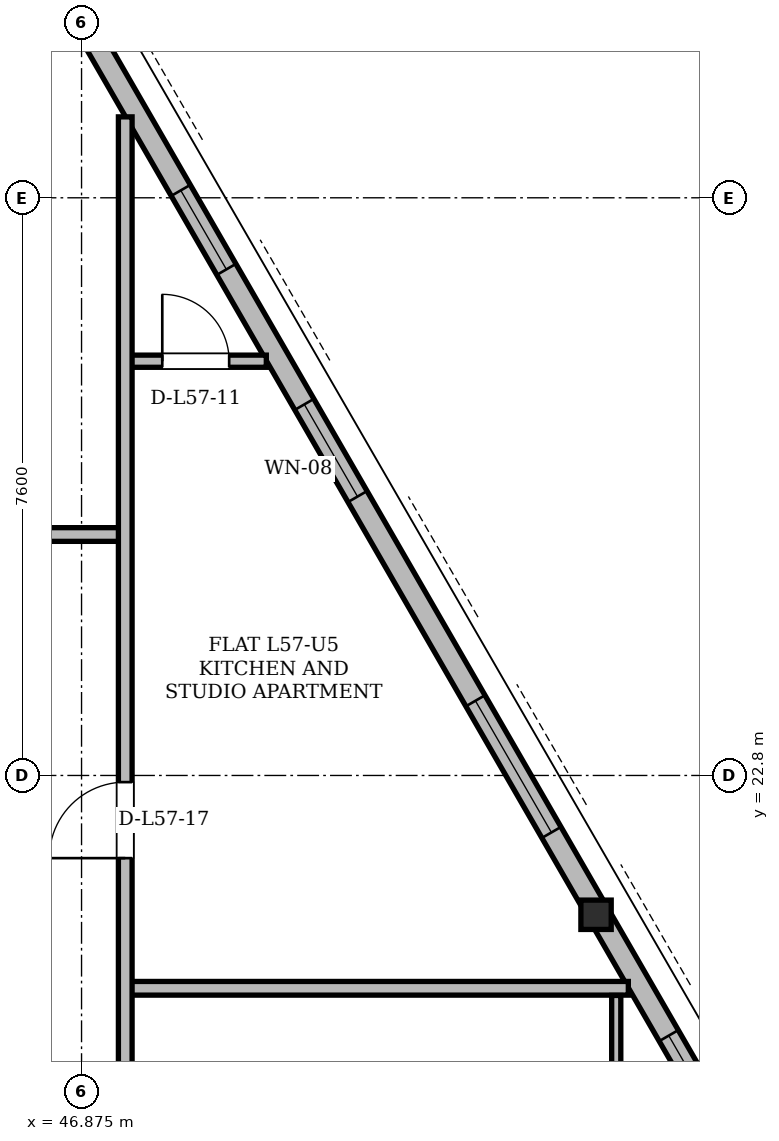
"""IFC4 building model, lengths in metres.
Left out: names, types, materials, properties, quantities, classifications, styles, units other than length and angle.
Written with IfcOpenShell. Run it as: python <this file> out.ifc"""

import sys

from ifc_helpers import new_model, si_unit, direction, frame, frame_2d, origin, origin_2d, place, context, subcontext, project, spatial, rectangle, i_section, extrude, element, fill, save


model = new_model("IFC4")
c1 = context("Model", 3, precision=1e-05, world=origin(), true_north=direction((0.0, 1.0)))
c2 = subcontext(c1, "Body", "Model", "MODEL_VIEW")
j1 = project(units=[si_unit("LENGTHUNIT", "METRE"), si_unit("PLANEANGLEUNIT", "RADIAN")], contexts=[c1])
p1 = place(None, origin())
s1 = spatial("IfcSite", under=j1, at=p1, CompositionType="ELEMENT")
p2 = place(p1, origin())
s2 = spatial("IfcBuilding", under=s1, at=p2, CompositionType="ELEMENT")
p3 = place(p2, frame((0.0, 0.0, 216.3)))
s3 = spatial("IfcBuildingStorey", under=s2, at=p3, CompositionType="ELEMENT", Elevation=216.3)
p4 = place(p3, frame((53.67, 20.989, 0.004), z_axis=(-0.014478387519, -0.011895388806, 0.999824422596), x_axis=(0.634816777898, -0.772662706813, 0.0)))
e1 = element("IfcColumn", 1, at=p4, inside=s3, PredefinedType="COLUMN", context=c2, shape_type="SweptSolid", body=[
    extrude(i_section(OverallWidth=0.399, OverallDepth=0.386, WebThickness=0.021, FlangeThickness=0.033, at=origin_2d()), origin(), (0.0, 0.0, 1.0), 3.592),
])
p5 = place(p3, frame((59.157, 11.485, 0.0), z_axis=(0.0, 0.0, 1.0), x_axis=(-0.500000353019, 0.866025199969, 0.0)))
e2 = element("IfcWall", 2, at=p5, inside=s3, PredefinedType="SOLIDWALL", context=c2, shape_type="SweptSolid", body=[
    extrude(rectangle(XDim=36.579, YDim=0.29, at=frame_2d((18.289, 0.0))), origin(), (0.0, 0.0, 1.0), 2.677),
])
p6 = place(p5, frame((3.429, 0.0, 0.0)))
e3 = element("IfcOpeningElement", 3, at=p6, cuts=e2, PredefinedType="OPENING", context=c2, shape_type="SweptSolid", body=[
    extrude(rectangle(XDim=1.5, YDim=2.2, at=frame_2d((0.75, 1.1))), frame((0.0, 0.145, 0.0), z_axis=(0.0, -1.0, 0.0), x_axis=(1.0, 0.0, 0.0)), (0.0, 0.0, 1.0), 0.29),
])
p7 = place(p5, frame((27.044, 0.0, 0.0)))
e4 = element("IfcOpeningElement", 4, at=p7, cuts=e2, PredefinedType="OPENING", context=c2, shape_type="SweptSolid", body=[
    extrude(rectangle(XDim=1.5, YDim=2.2, at=frame_2d((0.75, 1.1))), frame((0.0, 0.145, 0.0), z_axis=(0.0, -1.0, 0.0), x_axis=(1.0, 0.0, 0.0)), (0.0, 0.0, 1.0), 0.29),
])
p8 = place(p5, frame((7.913, 0.0, 0.85)))
e5 = element("IfcOpeningElement", 5, at=p8, cuts=e2, PredefinedType="OPENING", context=c2, shape_type="SweptSolid", body=[
    extrude(rectangle(XDim=1.2, YDim=1.48, at=frame_2d((0.6, 0.74))), frame((0.0, 0.145, 0.0), z_axis=(0.0, -1.0, 0.0), x_axis=(1.0, 0.0, 0.0)), (0.0, 0.0, 1.0), 0.29),
])
p9 = place(p5, frame((1.258, 0.0, 0.85)))
e6 = element("IfcOpeningElement", 6, at=p9, cuts=e2, PredefinedType="OPENING", context=c2, shape_type="SweptSolid", body=[
    extrude(rectangle(XDim=1.2, YDim=1.48, at=frame_2d((0.6, 0.74))), frame((0.0, 0.145, 0.0), z_axis=(0.0, -1.0, 0.0), x_axis=(1.0, 0.0, 0.0)), (0.0, 0.0, 1.0), 0.29),
])
p10 = place(p5, frame((12.2, 0.0, 0.85)))
e7 = element("IfcOpeningElement", 7, at=p10, cuts=e2, PredefinedType="OPENING", context=c2, shape_type="SweptSolid", body=[
    extrude(rectangle(XDim=2.0, YDim=1.717, at=frame_2d((1.0, 0.858))), frame((0.0, 0.145, 0.0), z_axis=(0.0, -1.0, 0.0), x_axis=(1.0, 0.0, 0.0)), (0.0, 0.0, 1.0), 0.29),
])
p11 = place(p5, frame((17.302, 0.0, 0.85)))
e8 = element("IfcOpeningElement", 8, at=p11, cuts=e2, PredefinedType="OPENING", context=c2, shape_type="SweptSolid", body=[
    extrude(rectangle(XDim=1.4, YDim=1.6, at=frame_2d((0.7, 0.8))), frame((0.0, 0.145, 0.0), z_axis=(0.0, -1.0, 0.0), x_axis=(1.0, 0.0, 0.0)), (0.0, 0.0, 1.0), 0.29),
])
p12 = place(p5, frame((20.753, 0.0, 0.85)))
e9 = element("IfcOpeningElement", 9, at=p12, cuts=e2, PredefinedType="OPENING", context=c2, shape_type="SweptSolid", body=[
    extrude(rectangle(XDim=1.2, YDim=1.48, at=frame_2d((0.6, 0.74))), frame((0.0, 0.145, 0.0), z_axis=(0.0, -1.0, 0.0), x_axis=(1.0, 0.0, 0.0)), (0.0, 0.0, 1.0), 0.29),
])
p13 = place(p5, frame((34.201, 0.0, 0.85)))
e10 = element("IfcOpeningElement", 10, at=p13, cuts=e2, PredefinedType="OPENING", context=c2, shape_type="SweptSolid", body=[
    extrude(rectangle(XDim=1.2, YDim=1.48, at=frame_2d((0.6, 0.74))), frame((0.0, 0.145, 0.0), z_axis=(0.0, -1.0, 0.0), x_axis=(1.0, 0.0, 0.0)), (0.0, 0.0, 1.0), 0.29),
])
p14 = place(p3, frame((47.45, 20.0, 0.0), z_axis=(0.0, 0.0, 1.0), x_axis=(1.0, 0.0, 0.0)))
e11 = element("IfcWall", 11, at=p14, inside=s3, PredefinedType="PARTITIONING", context=c2, shape_type="SweptSolid", body=[
    extrude(rectangle(XDim=6.619, YDim=0.18, at=frame_2d((3.31, 0.0))), origin(), (0.0, 0.0, 1.0), 3.38),
])
p15 = place(p3, frame((25.6, 25.97, 0.0), z_axis=(0.0, 0.0, 1.0), x_axis=(1.0, 0.0, 0.0)))
e12 = element("IfcWall", 12, at=p15, inside=s3, PredefinedType="PARTITIONING", context=c2, shape_type="SweptSolid", body=[
    extrude(rectangle(XDim=21.85, YDim=0.18, at=frame_2d((10.925, 0.0))), origin(), (0.0, 0.0, 1.0), 2.913),
])
p16 = place(p15, frame((5.347, 0.0, 0.0)))
e13 = element("IfcOpeningElement", 13, at=p16, cuts=e12, PredefinedType="OPENING", context=c2, shape_type="SweptSolid", body=[
    extrude(rectangle(XDim=1.0, YDim=2.18, at=frame_2d((0.5, 1.09))), frame((0.0, 0.09, 0.0), z_axis=(0.0, -1.0, 0.0), x_axis=(1.0, 0.0, 0.0)), (0.0, 0.0, 1.0), 0.18),
])
p17 = place(p15, frame((15.35, 0.0, 0.0)))
e14 = element("IfcOpeningElement", 14, at=p17, cuts=e12, PredefinedType="OPENING", context=c2, shape_type="SweptSolid", body=[
    extrude(rectangle(XDim=1.3, YDim=2.2, at=frame_2d((0.65, 1.1))), frame((0.0, 0.09, 0.0), z_axis=(0.0, -1.0, 0.0), x_axis=(1.0, 0.0, 0.0)), (0.0, 0.0, 1.0), 0.18),
])
p18 = place(p15, frame((18.94, 0.0, 0.0)))
e15 = element("IfcOpeningElement", 15, at=p18, cuts=e12, PredefinedType="OPENING", context=c2, shape_type="SweptSolid", body=[
    extrude(rectangle(XDim=1.0, YDim=2.18, at=frame_2d((0.5, 1.09))), frame((0.0, 0.09, 0.0), z_axis=(0.0, -1.0, 0.0), x_axis=(1.0, 0.0, 0.0)), (0.0, 0.0, 1.0), 0.18),
])
p19 = place(p3, frame((47.368, 28.25, 0.0), z_axis=(0.0, 0.0, 1.0), x_axis=(1.0, 0.0, 0.0)))
e16 = element("IfcWall", 16, at=p19, inside=s3, PredefinedType="PARTITIONING", context=c2, shape_type="SweptSolid", body=[
    extrude(rectangle(XDim=1.938, YDim=0.16, at=frame_2d((0.969, 0.0))), origin(), (0.0, 0.0, 1.0), 3.38),
])
p20 = place(p19, frame((0.569, 0.0, 0.0)))
e17 = element("IfcOpeningElement", 17, at=p20, cuts=e16, PredefinedType="OPENING", context=c2, shape_type="SweptSolid", body=[
    extrude(rectangle(XDim=0.88, YDim=2.08, at=frame_2d((0.44, 1.04))), frame((0.0, 0.08, 0.0), z_axis=(0.0, -1.0, 0.0), x_axis=(1.0, 0.0, 0.0)), (0.0, 0.0, 1.0), 0.16),
])
p21 = place(p3, frame((47.45, 5.801, 0.0), z_axis=(0.0, 0.0, 1.0), x_axis=(0.0, 1.0, 0.0)))
e18 = element("IfcWall", 18, at=p21, inside=s3, PredefinedType="PARTITIONING", context=c2, shape_type="SweptSolid", body=[
    extrude(rectangle(XDim=25.664, YDim=0.18, at=frame_2d((12.832, 0.0))), origin(), (0.0, 0.0, 1.0), 2.913),
])
p22 = place(p21, frame((9.122, 0.0, 0.0)))
e19 = element("IfcOpeningElement", 19, at=p22, cuts=e18, PredefinedType="OPENING", context=c2, shape_type="SweptSolid", body=[
    extrude(rectangle(XDim=1.0, YDim=2.18, at=frame_2d((0.5, 1.09))), frame((0.0, 0.09, 0.0), z_axis=(0.0, -1.0, 0.0), x_axis=(1.0, 0.0, 0.0)), (0.0, 0.0, 1.0), 0.18),
])
p23 = place(p21, frame((15.912, 0.0, 0.0)))
e20 = element("IfcOpeningElement", 20, at=p23, cuts=e18, PredefinedType="OPENING", context=c2, shape_type="SweptSolid", body=[
    extrude(rectangle(XDim=1.0, YDim=2.18, at=frame_2d((0.5, 1.09))), frame((0.0, 0.09, 0.0), z_axis=(0.0, -1.0, 0.0), x_axis=(1.0, 0.0, 0.0)), (0.0, 0.0, 1.0), 0.18),
])
p24 = place(p3, frame((53.91, 5.801, 0.0), z_axis=(0.0, 0.0, 1.0), x_axis=(0.0, 1.0, 0.0)))
e21 = element("IfcWall", 21, at=p24, inside=s3, PredefinedType="PARTITIONING", context=c2, shape_type="SweptSolid", body=[
    extrude(rectangle(XDim=14.105, YDim=0.12, at=frame_2d((7.053, 0.0))), origin(), (0.0, 0.0, 1.0), 2.913),
])
p25 = place(p24, frame((0.698, 0.0, 0.0)))
e22 = element("IfcOpeningElement", 22, at=p25, cuts=e21, PredefinedType="OPENING", context=c2, shape_type="SweptSolid", body=[
    extrude(rectangle(XDim=0.88, YDim=2.08, at=frame_2d((0.44, 1.04))), frame((0.0, 0.06, 0.0), z_axis=(0.0, -1.0, 0.0), x_axis=(1.0, 0.0, 0.0)), (0.0, 0.0, 1.0), 0.12),
])
p26 = place(p24, frame((2.989, 0.0, 0.0)))
e23 = element("IfcOpeningElement", 23, at=p26, cuts=e21, PredefinedType="OPENING", context=c2, shape_type="SweptSolid", body=[
    extrude(rectangle(XDim=0.95, YDim=2.1, at=frame_2d((0.475, 1.05))), frame((0.0, 0.06, 0.0), z_axis=(0.0, -1.0, 0.0), x_axis=(1.0, 0.0, 0.0)), (0.0, 0.0, 1.0), 0.12),
])
p27 = place(p24, frame((8.966, 0.0, 0.0)))
e24 = element("IfcOpeningElement", 24, at=p27, cuts=e21, PredefinedType="OPENING", context=c2, shape_type="SweptSolid", body=[
    extrude(rectangle(XDim=0.92, YDim=2.12, at=frame_2d((0.46, 1.06))), frame((0.0, 0.06, 0.0), z_axis=(0.0, -1.0, 0.0), x_axis=(1.0, 0.0, 0.0)), (0.0, 0.0, 1.0), 0.12),
])
p28 = place(p8, origin())
e25 = element("IfcWindow", 25, at=p28, inside=s3, PartitioningType="SINGLE_PANEL", PredefinedType="WINDOW", context=c2, shape_type="SweptSolid", body=[
    extrude(rectangle(XDim=1.2, YDim=1.48, at=frame_2d((0.6, 0.74))), frame((0.0, 0.03, 0.0), z_axis=(0.0, -1.0, 0.0), x_axis=(1.0, 0.0, 0.0)), (0.0, 0.0, 1.0), 0.06),
])
fill(e5, e25)
p29 = place(p10, origin())
e26 = element("IfcWindow", 26, at=p29, inside=s3, PartitioningType="SINGLE_PANEL", PredefinedType="WINDOW", context=c2, shape_type="SweptSolid", body=[
    extrude(rectangle(XDim=2.0, YDim=1.717, at=frame_2d((1.0, 0.858))), frame((0.0, 0.03, 0.0), z_axis=(0.0, -1.0, 0.0), x_axis=(1.0, 0.0, 0.0)), (0.0, 0.0, 1.0), 0.06),
])
fill(e7, e26)
p30 = place(p11, origin())
e27 = element("IfcWindow", 27, at=p30, inside=s3, PartitioningType="SINGLE_PANEL", PredefinedType="WINDOW", context=c2, shape_type="SweptSolid", body=[
    extrude(rectangle(XDim=1.4, YDim=1.6, at=frame_2d((0.7, 0.8))), frame((0.0, 0.03, 0.0), z_axis=(0.0, -1.0, 0.0), x_axis=(1.0, 0.0, 0.0)), (0.0, 0.0, 1.0), 0.06),
])
fill(e8, e27)
p31 = place(p12, origin())
e28 = element("IfcWindow", 28, at=p31, inside=s3, PartitioningType="SINGLE_PANEL", PredefinedType="WINDOW", context=c2, shape_type="SweptSolid", body=[
    extrude(rectangle(XDim=1.2, YDim=1.48, at=frame_2d((0.6, 0.74))), frame((0.0, 0.03, 0.0), z_axis=(0.0, -1.0, 0.0), x_axis=(1.0, 0.0, 0.0)), (0.0, 0.0, 1.0), 0.06),
])
fill(e9, e28)
p32 = place(p20, origin())
e29 = element("IfcDoor", 29, at=p32, inside=s3, OperationType="SINGLE_SWING_LEFT", PredefinedType="DOOR", context=c2, shape_type="SweptSolid", body=[
    extrude(rectangle(XDim=0.88, YDim=2.08, at=frame_2d((0.44, 1.04))), frame((0.0, 0.025, 0.0), z_axis=(0.0, -1.0, 0.0), x_axis=(1.0, 0.0, 0.0)), (0.0, 0.0, 1.0), 0.05),
])
fill(e17, e29)
p33 = place(p23, origin())
e30 = element("IfcDoor", 30, at=p33, inside=s3, OperationType="SINGLE_SWING_LEFT", PredefinedType="DOOR", context=c2, shape_type="SweptSolid", body=[
    extrude(rectangle(XDim=1.0, YDim=2.18, at=frame_2d((0.5, 1.09))), frame((0.0, 0.025, 0.0), z_axis=(0.0, -1.0, 0.0), x_axis=(1.0, 0.0, 0.0)), (0.0, 0.0, 1.0), 0.05),
])
fill(e20, e30)
save(model, sys.argv[1])
